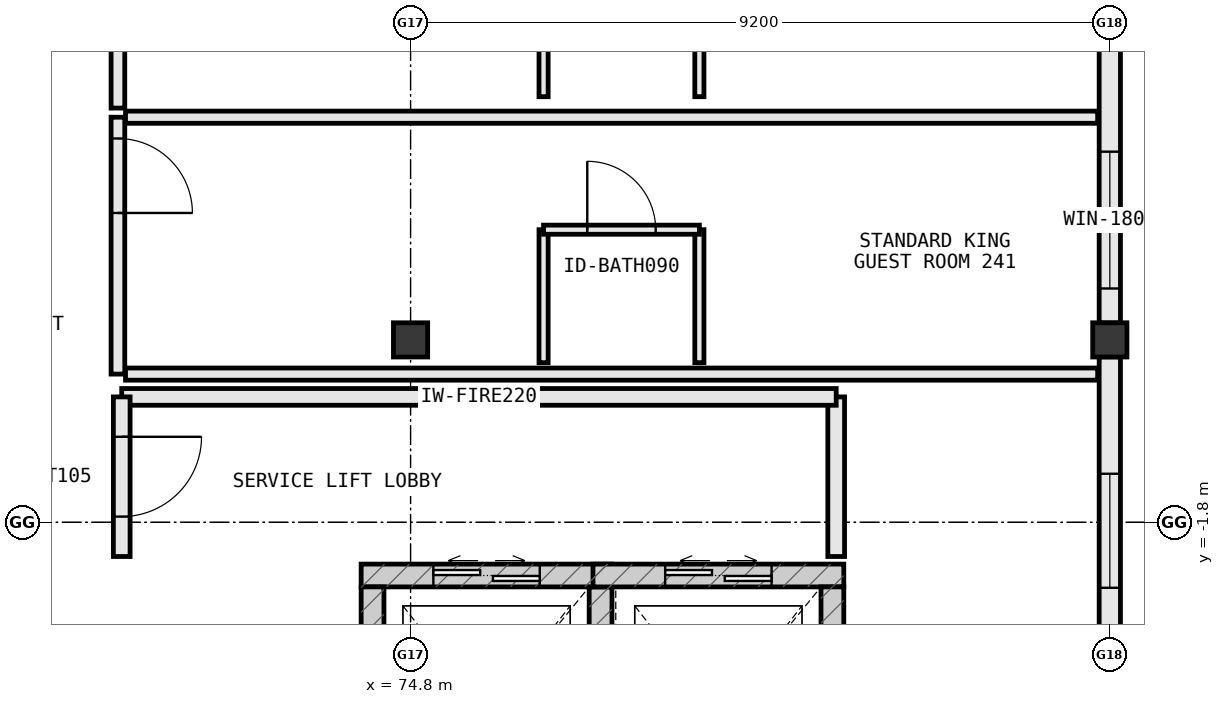
"""IFC4 building model, lengths in metres.
Left out: names, types, materials, properties, quantities, classifications, styles, units other than length and angle.
Written with IfcOpenShell. Run it as: python <this file> out.ifc"""

import sys

from ifc_helpers import new_model, si_unit, direction, frame, frame_2d, origin, origin_2d, place, context, subcontext, project, spatial, rectangle, extrude, element, fill, save


model = new_model("IFC4")
c1 = context("Model", 3, precision=1e-05, world=origin(), true_north=direction((0.0, 1.0)))
c2 = subcontext(c1, "Body", "Model", "MODEL_VIEW")
j1 = project(units=[si_unit("LENGTHUNIT", "METRE"), si_unit("PLANEANGLEUNIT", "RADIAN")], contexts=[c1])
p1 = place(None, origin())
s1 = spatial("IfcSite", under=j1, at=p1, CompositionType="ELEMENT")
p2 = place(p1, origin())
s2 = spatial("IfcBuilding", under=s1, at=p2, CompositionType="ELEMENT")
p3 = place(p2, frame((0.0, 0.0, 35.2)))
s3 = spatial("IfcBuildingStorey", under=s2, at=p3, CompositionType="ELEMENT", Elevation=35.2)
for number, where, z_axis, x_axis in (
    (1, (74.8, 0.6, 0.0), (0.0, 0.0, 1.0), (1.0, 0.0, 0.0)),
    (2, (84.0, 0.6, 0.0), (0.0, 0.0, 1.0), (1.0, 0.0, 0.0)),
):
    element("IfcColumn", number, at=place(p3, frame(where, z_axis=z_axis, x_axis=x_axis)), inside=s3, PredefinedType="COLUMN", context=c2, shape_type="SweptSolid", body=[
        extrude(rectangle(XDim=0.45, YDim=0.45, at=origin_2d()), origin(), (0.0, 0.0, 1.0), 3.8),
    ])
p4 = place(p3, frame((84.0, -8.777, 0.0), z_axis=(0.0, 0.0, 1.0), x_axis=(0.0, 1.0, 0.0)))
e3 = element("IfcWall", 3, at=p4, inside=s3, PredefinedType="STANDARD", context=c2, shape_type="SweptSolid", body=[
    extrude(rectangle(XDim=9.154, YDim=0.28, at=frame_2d((4.577, 0.0))), origin(), (0.0, 0.0, 1.0), 2.98),
])
p5 = place(p4, frame((1.539, 0.0, 0.85)))
e4 = element("IfcOpeningElement", 4, at=p5, cuts=e3, PredefinedType="OPENING", context=c2, shape_type="SweptSolid", body=[
    extrude(rectangle(XDim=1.5, YDim=1.75, at=frame_2d((0.75, 0.875))), frame((0.0, 0.152, 0.0), z_axis=(0.0, -1.0, 0.0), x_axis=(1.0, 0.0, 0.0)), (0.0, 0.0, 1.0), 0.304),
])
p6 = place(p4, frame((6.115, 0.0, 0.85)))
e5 = element("IfcOpeningElement", 5, at=p6, cuts=e3, PredefinedType="OPENING", context=c2, shape_type="SweptSolid", body=[
    extrude(rectangle(XDim=1.5, YDim=1.75, at=frame_2d((0.75, 0.875))), frame((0.0, 0.152, 0.0), z_axis=(0.0, -1.0, 0.0), x_axis=(1.0, 0.0, 0.0)), (0.0, 0.0, 1.0), 0.304),
])
p7 = place(p3, frame((84.0, 0.823, 0.0), z_axis=(0.0, 0.0, 1.0), x_axis=(0.0, 1.0, 0.0)))
e6 = element("IfcWall", 6, at=p7, inside=s3, PredefinedType="STANDARD", context=c2, shape_type="SweptSolid", body=[
    extrude(rectangle(XDim=9.154, YDim=0.28, at=frame_2d((4.577, 0.0))), origin(), (0.0, 0.0, 1.0), 2.98),
])
p8 = place(p7, frame((0.454, 0.0, 0.85)))
e7 = element("IfcOpeningElement", 7, at=p8, cuts=e6, PredefinedType="OPENING", context=c2, shape_type="SweptSolid", body=[
    extrude(rectangle(XDim=1.8, YDim=1.85, at=frame_2d((0.9, 0.925))), frame((0.0, 0.152, 0.0), z_axis=(0.0, -1.0, 0.0), x_axis=(1.0, 0.0, 0.0)), (0.0, 0.0, 1.0), 0.304),
])
p9 = place(p7, frame((3.617, 0.0, 0.85)))
e8 = element("IfcOpeningElement", 8, at=p9, cuts=e6, PredefinedType="OPENING", context=c2, shape_type="SweptSolid", body=[
    extrude(rectangle(XDim=1.8, YDim=1.85, at=frame_2d((0.9, 0.925))), frame((0.0, 0.152, 0.0), z_axis=(0.0, -1.0, 0.0), x_axis=(1.0, 0.0, 0.0)), (0.0, 0.0, 1.0), 0.304),
])
p10 = place(p7, frame((6.841, 0.0, 0.85)))
e9 = element("IfcOpeningElement", 9, at=p10, cuts=e6, PredefinedType="OPENING", context=c2, shape_type="SweptSolid", body=[
    extrude(rectangle(XDim=1.8, YDim=1.85, at=frame_2d((0.9, 0.925))), frame((0.0, 0.152, 0.0), z_axis=(0.0, -1.0, 0.0), x_axis=(1.0, 0.0, 0.0)), (0.0, 0.0, 1.0), 0.304),
])
p11 = place(p3, frame((77.45, -2.5, 0.0), z_axis=(0.0, 0.0, 1.0), x_axis=(-1.0, 0.0, 0.0)))
e10 = element("IfcWall", 10, at=p11, inside=s3, PredefinedType="SHEAR", context=c2, shape_type="SweptSolid", body=[
    extrude(rectangle(XDim=3.3, YDim=0.3, at=frame_2d((1.65, 0.0))), origin(), (0.0, 0.0, 1.0), 3.8),
])
p12 = place(p11, frame((0.95, 0.0, 0.0)))
e11 = element("IfcOpeningElement", 11, at=p12, cuts=e10, PredefinedType="OPENING", context=c2, shape_type="SweptSolid", body=[
    extrude(rectangle(XDim=1.4, YDim=2.2, at=frame_2d((0.7, 1.1))), frame((0.0, 0.162, 0.0), z_axis=(0.0, -1.0, 0.0), x_axis=(1.0, 0.0, 0.0)), (0.0, 0.0, 1.0), 0.324),
])
for number, where, z_axis, x_axis in (
    (12, (77.3, -5.95, 0.0), (0.0, 0.0, 1.0), (0.0, 1.0, 0.0)),
    (13, (74.3, -2.65, 0.0), (0.0, 0.0, 1.0), (0.0, -1.0, 0.0)),
):
    element("IfcWall", number, at=place(p3, frame(where, z_axis=z_axis, x_axis=x_axis)), inside=s3, PredefinedType="SHEAR", context=c2, shape_type="SweptSolid", body=[
        extrude(rectangle(XDim=3.3, YDim=0.3, at=frame_2d((1.65, 0.0))), origin(), (0.0, 0.0, 1.0), 3.8),
    ])
p13 = place(p3, frame((80.5, -2.5, 0.0), z_axis=(0.0, 0.0, 1.0), x_axis=(-1.0, 0.0, 0.0)))
e14 = element("IfcWall", 14, at=p13, inside=s3, PredefinedType="SHEAR", context=c2, shape_type="SweptSolid", body=[
    extrude(rectangle(XDim=3.3, YDim=0.3, at=frame_2d((1.65, 0.0))), origin(), (0.0, 0.0, 1.0), 3.8),
])
p14 = place(p13, frame((0.95, 0.0, 0.0)))
e15 = element("IfcOpeningElement", 15, at=p14, cuts=e14, PredefinedType="OPENING", context=c2, shape_type="SweptSolid", body=[
    extrude(rectangle(XDim=1.4, YDim=2.2, at=frame_2d((0.7, 1.1))), frame((0.0, 0.162, 0.0), z_axis=(0.0, -1.0, 0.0), x_axis=(1.0, 0.0, 0.0)), (0.0, 0.0, 1.0), 0.324),
])
p15 = place(p3, frame((80.35, -5.95, 0.0), z_axis=(0.0, 0.0, 1.0), x_axis=(0.0, 1.0, 0.0)))
e16 = element("IfcWall", 16, at=p15, inside=s3, PredefinedType="SHEAR", context=c2, shape_type="SweptSolid", body=[
    extrude(rectangle(XDim=3.3, YDim=0.3, at=frame_2d((1.65, 0.0))), origin(), (0.0, 0.0, 1.0), 3.8),
])
p16 = place(p3, frame((80.4, -2.25, 0.0), z_axis=(0.0, 0.0, 1.0), x_axis=(0.0, 1.0, 0.0)))
e17 = element("IfcWall", 17, at=p16, inside=s3, PredefinedType="STANDARD", context=c2, shape_type="SweptSolid", body=[
    extrude(rectangle(XDim=2.1, YDim=0.22, at=frame_2d((1.05, 0.0))), origin(), (0.0, 0.0, 1.0), 3.565),
])
p17 = place(p3, frame((80.4, -0.15, 0.0), z_axis=(0.0, 0.0, 1.0), x_axis=(-1.0, 0.0, 0.0)))
e18 = element("IfcWall", 18, at=p17, inside=s3, PredefinedType="STANDARD", context=c2, shape_type="SweptSolid", body=[
    extrude(rectangle(XDim=9.4, YDim=0.22, at=frame_2d((4.7, 0.0))), origin(), (0.0, 0.0, 1.0), 3.565),
])
p18 = place(p3, frame((71.0, -0.15, 0.0), z_axis=(0.0, 0.0, 1.0), x_axis=(0.0, -1.0, 0.0)))
e19 = element("IfcWall", 19, at=p18, inside=s3, PredefinedType="STANDARD", context=c2, shape_type="SweptSolid", body=[
    extrude(rectangle(XDim=2.1, YDim=0.22, at=frame_2d((1.05, 0.0))), origin(), (0.0, 0.0, 1.0), 3.565),
])
p19 = place(p18, frame((0.525, 0.0, 0.0)))
e20 = element("IfcOpeningElement", 20, at=p19, cuts=e19, PredefinedType="OPENING", context=c2, shape_type="SweptSolid", body=[
    extrude(rectangle(XDim=1.05, YDim=2.2, at=frame_2d((0.525, 1.1))), frame((0.0, 0.122, 0.0), z_axis=(0.0, -1.0, 0.0), x_axis=(1.0, 0.0, 0.0)), (0.0, 0.0, 1.0), 0.244),
])
p20 = place(p3, frame((70.95, 3.53, 0.0), z_axis=(0.0, 0.0, 1.0), x_axis=(0.0, -1.0, 0.0)))
e21 = element("IfcWall", 21, at=p20, inside=s3, PredefinedType="PARTITIONING", context=c2, shape_type="SweptSolid", body=[
    extrude(rectangle(XDim=3.38, YDim=0.18, at=frame_2d((1.69, 0.0))), origin(), (0.0, 0.0, 1.0), 3.565),
])
p21 = place(p20, frame((0.28, 0.0, 0.0)))
e22 = element("IfcOpeningElement", 22, at=p21, cuts=e21, PredefinedType="OPENING", context=c2, shape_type="SweptSolid", body=[
    extrude(rectangle(XDim=0.98, YDim=2.18, at=frame_2d((0.49, 1.09))), frame((0.0, 0.102, 0.0), z_axis=(0.0, -1.0, 0.0), x_axis=(1.0, 0.0, 0.0)), (0.0, 0.0, 1.0), 0.204),
])
for number, where, z_axis, x_axis in (
    (23, (71.05, 0.15, 0.0), (0.0, 0.0, 1.0), (1.0, 0.0, 0.0)),
    (24, (71.05, 3.53, 0.0), (0.0, 0.0, 1.0), (1.0, 0.0, 0.0)),
):
    element("IfcWall", number, at=place(p3, frame(where, z_axis=z_axis, x_axis=x_axis)), inside=s3, PredefinedType="PARTITIONING", context=c2, shape_type="SweptSolid", body=[
        extrude(rectangle(XDim=12.79, YDim=0.16, at=frame_2d((6.395, 0.0))), origin(), (0.0, 0.0, 1.0), 3.565),
    ])
for number, where, z_axis, x_axis in (
    (25, (76.55, 0.3, 0.0), (0.0, 0.0, 1.0), (0.0, 1.0, 0.0)),
    (26, (78.6, 0.3, 0.0), (0.0, 0.0, 1.0), (0.0, 1.0, 0.0)),
):
    element("IfcWall", number, at=place(p3, frame(where, z_axis=z_axis, x_axis=x_axis)), inside=s3, PredefinedType="PARTITIONING", context=c2, shape_type="SweptSolid", body=[
        extrude(rectangle(XDim=1.75, YDim=0.12, at=frame_2d((0.875, 0.0))), origin(), (0.0, 0.0, 1.0), 3.565),
    ])
p22 = place(p3, frame((76.55, 2.05, 0.0), z_axis=(0.0, 0.0, 1.0), x_axis=(1.0, 0.0, 0.0)))
e27 = element("IfcWall", 27, at=p22, inside=s3, PredefinedType="PARTITIONING", context=c2, shape_type="SweptSolid", body=[
    extrude(rectangle(XDim=2.05, YDim=0.12, at=frame_2d((1.025, 0.0))), origin(), (0.0, 0.0, 1.0), 3.565),
])
p23 = place(p22, frame((0.575, 0.0, 0.0)))
e28 = element("IfcOpeningElement", 28, at=p23, cuts=e27, PredefinedType="OPENING", context=c2, shape_type="SweptSolid", body=[
    extrude(rectangle(XDim=0.9, YDim=2.15, at=frame_2d((0.45, 1.075))), frame((0.0, 0.072, 0.0), z_axis=(0.0, -1.0, 0.0), x_axis=(1.0, 0.0, 0.0)), (0.0, 0.0, 1.0), 0.144),
])
p24 = place(p3, frame((70.95, 7.03, 0.0), z_axis=(0.0, 0.0, 1.0), x_axis=(0.0, -1.0, 0.0)))
e29 = element("IfcWall", 29, at=p24, inside=s3, PredefinedType="PARTITIONING", context=c2, shape_type="SweptSolid", body=[
    extrude(rectangle(XDim=3.38, YDim=0.18, at=frame_2d((1.69, 0.0))), origin(), (0.0, 0.0, 1.0), 3.565),
])
p25 = place(p24, frame((0.28, 0.0, 0.0)))
e30 = element("IfcOpeningElement", 30, at=p25, cuts=e29, PredefinedType="OPENING", context=c2, shape_type="SweptSolid", body=[
    extrude(rectangle(XDim=0.98, YDim=2.18, at=frame_2d((0.49, 1.09))), frame((0.0, 0.102, 0.0), z_axis=(0.0, -1.0, 0.0), x_axis=(1.0, 0.0, 0.0)), (0.0, 0.0, 1.0), 0.204),
])
for number, where, z_axis, x_axis in (
    (31, (76.55, 3.8, 0.0), (0.0, 0.0, 1.0), (0.0, 1.0, 0.0)),
    (32, (78.6, 3.8, 0.0), (0.0, 0.0, 1.0), (0.0, 1.0, 0.0)),
):
    element("IfcWall", number, at=place(p3, frame(where, z_axis=z_axis, x_axis=x_axis)), inside=s3, PredefinedType="PARTITIONING", context=c2, shape_type="SweptSolid", body=[
        extrude(rectangle(XDim=1.75, YDim=0.12, at=frame_2d((0.875, 0.0))), origin(), (0.0, 0.0, 1.0), 3.565),
    ])
p26 = place(p6, origin())
e33 = element("IfcWindow", 33, at=p26, inside=s3, PartitioningType="SINGLE_PANEL", PredefinedType="WINDOW", context=c2, shape_type="SweptSolid", body=[
    extrude(rectangle(XDim=1.5, YDim=1.75, at=frame_2d((0.75, 0.875))), frame((0.0, 0.03, 0.0), z_axis=(0.0, -1.0, 0.0), x_axis=(1.0, 0.0, 0.0)), (0.0, 0.0, 1.0), 0.06),
])
fill(e5, e33)
p27 = place(p8, origin())
e34 = element("IfcWindow", 34, at=p27, inside=s3, PartitioningType="SINGLE_PANEL", PredefinedType="WINDOW", context=c2, shape_type="SweptSolid", body=[
    extrude(rectangle(XDim=1.8, YDim=1.85, at=frame_2d((0.9, 0.925))), frame((0.0, 0.03, 0.0), z_axis=(0.0, -1.0, 0.0), x_axis=(1.0, 0.0, 0.0)), (0.0, 0.0, 1.0), 0.06),
])
fill(e7, e34)
p28 = place(p12, origin())
e35 = element("IfcDoor", 35, at=p28, inside=s3, OperationType="DOUBLE_DOOR_SLIDING", PredefinedType="DOOR", context=c2, shape_type="SweptSolid", body=[
    extrude(rectangle(XDim=1.4, YDim=2.2, at=frame_2d((0.7, 1.1))), frame((0.0, 0.025, 0.0), z_axis=(0.0, -1.0, 0.0), x_axis=(1.0, 0.0, 0.0)), (0.0, 0.0, 1.0), 0.05),
])
fill(e11, e35)
p29 = place(p14, origin())
e36 = element("IfcDoor", 36, at=p29, inside=s3, OperationType="DOUBLE_DOOR_SLIDING", PredefinedType="DOOR", context=c2, shape_type="SweptSolid", body=[
    extrude(rectangle(XDim=1.4, YDim=2.2, at=frame_2d((0.7, 1.1))), frame((0.0, 0.025, 0.0), z_axis=(0.0, -1.0, 0.0), x_axis=(1.0, 0.0, 0.0)), (0.0, 0.0, 1.0), 0.05),
])
fill(e15, e36)
p30 = place(p19, origin())
e37 = element("IfcDoor", 37, at=p30, inside=s3, OperationType="SINGLE_SWING_LEFT", PredefinedType="DOOR", context=c2, shape_type="SweptSolid", body=[
    extrude(rectangle(XDim=1.05, YDim=2.2, at=frame_2d((0.525, 1.1))), frame((0.0, 0.025, 0.0), z_axis=(0.0, -1.0, 0.0), x_axis=(1.0, 0.0, 0.0)), (0.0, 0.0, 1.0), 0.05),
])
fill(e20, e37)
p31 = place(p21, origin())
e38 = element("IfcDoor", 38, at=p31, inside=s3, OperationType="SINGLE_SWING_RIGHT", PredefinedType="DOOR", context=c2, shape_type="SweptSolid", body=[
    extrude(rectangle(XDim=0.98, YDim=2.18, at=frame_2d((0.49, 1.09))), frame((0.0, 0.025, 0.0), z_axis=(0.0, -1.0, 0.0), x_axis=(1.0, 0.0, 0.0)), (0.0, 0.0, 1.0), 0.05),
])
fill(e22, e38)
p32 = place(p23, origin())
e39 = element("IfcDoor", 39, at=p32, inside=s3, OperationType="SINGLE_SWING_LEFT", PredefinedType="DOOR", context=c2, shape_type="SweptSolid", body=[
    extrude(rectangle(XDim=0.9, YDim=2.15, at=frame_2d((0.45, 1.075))), frame((0.0, 0.025, 0.0), z_axis=(0.0, -1.0, 0.0), x_axis=(1.0, 0.0, 0.0)), (0.0, 0.0, 1.0), 0.05),
])
fill(e28, e39)
save(model, sys.argv[1])
